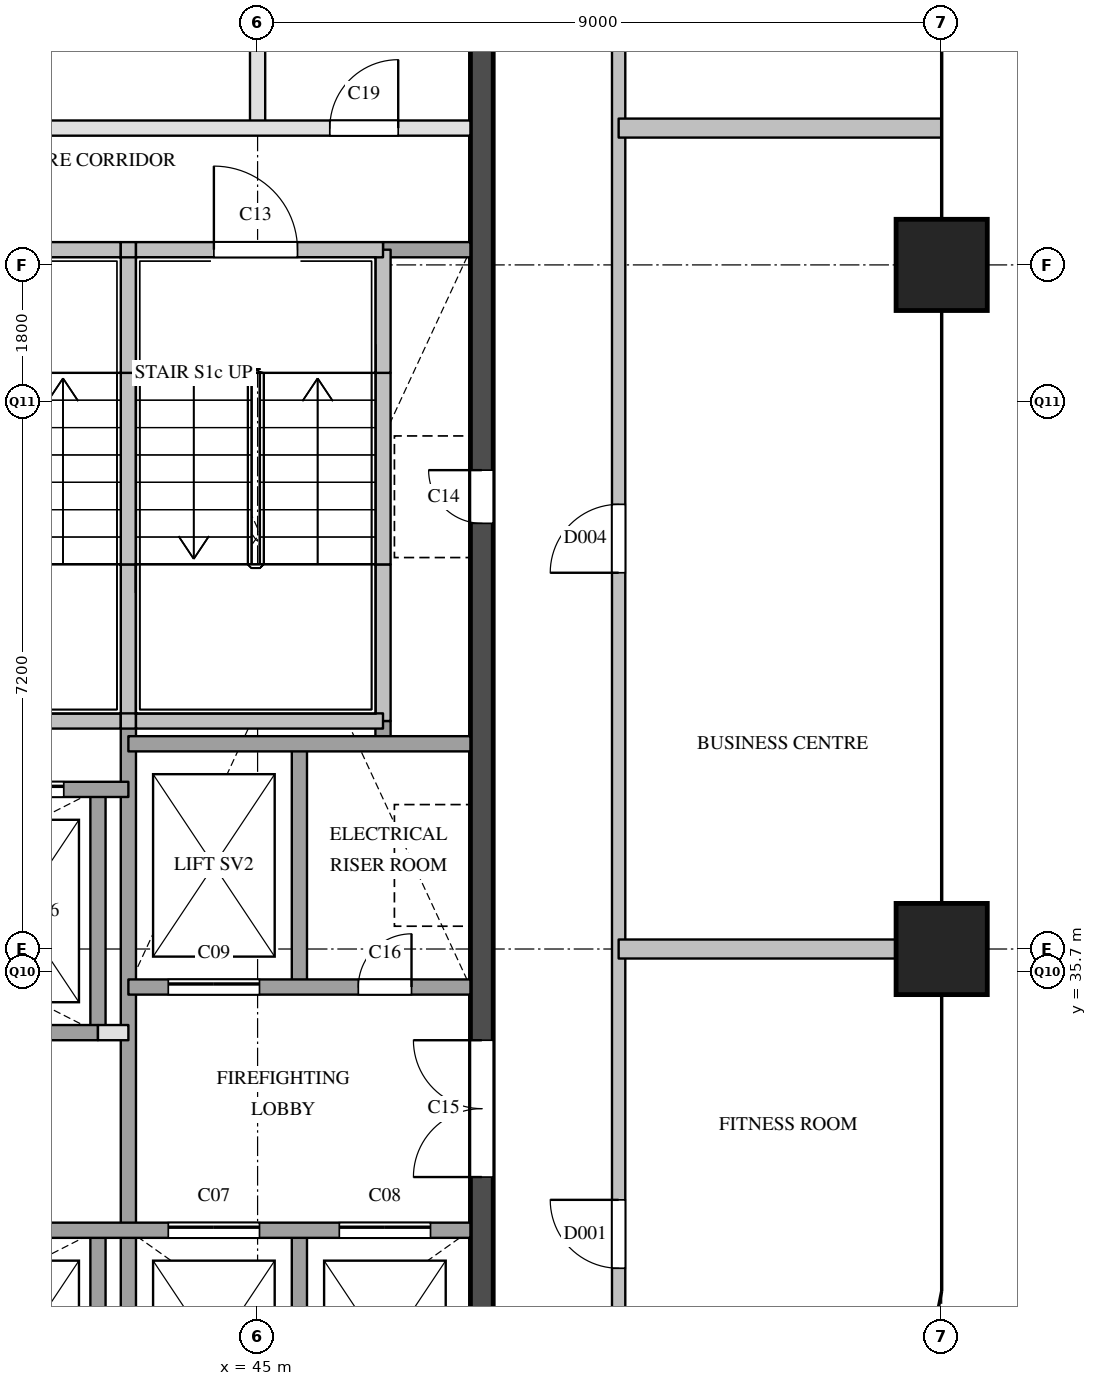
"""IFC4 building model, lengths in metres.
Left out: names, types, materials, properties, quantities, classifications, styles, units other than length and angle.
Written with IfcOpenShell. Run it as: python <this file> out.ifc"""

import sys

from ifc_helpers import new_model, si_unit, direction, frame, frame_2d, origin, origin_2d, place, context, subcontext, project, spatial, rectangle, extrude, element, fill, save


model = new_model("IFC4")
c1 = context("Model", 3, precision=1e-05, world=origin(), true_north=direction((0.0, 1.0)))
c2 = subcontext(c1, "Body", "Model", "MODEL_VIEW")
j1 = project(units=[si_unit("LENGTHUNIT", "METRE"), si_unit("PLANEANGLEUNIT", "RADIAN")], contexts=[c1])
p1 = place(None, origin())
s1 = spatial("IfcSite", under=j1, at=p1, CompositionType="ELEMENT")
p2 = place(p1, origin())
s2 = spatial("IfcBuilding", under=s1, at=p2, CompositionType="ELEMENT")
p3 = place(p2, frame((0.0, 0.0, 290.2)))
s3 = spatial("IfcBuildingStorey", under=s2, at=p3, CompositionType="ELEMENT", Elevation=290.2)
for number, where, z_axis, x_axis in (
    (1, (54.0, 36.0, 0.0), (0.0, 0.0, 1.0), (1.0, 0.0, 0.0)),
    (2, (54.0, 45.0, 0.0), (0.0, 0.0, 1.0), (1.0, 0.0, 0.0)),
):
    element("IfcColumn", number, at=place(p3, frame(where, z_axis=z_axis, x_axis=x_axis)), inside=s3, PredefinedType="COLUMN", context=c2, shape_type="SweptSolid", body=[
        extrude(rectangle(XDim=1.2, YDim=1.2, at=origin_2d()), origin(), (0.0, 0.0, 1.0), 5.0),
    ])
p4 = place(p3, frame((47.95, 29.1, 0.0), z_axis=(0.0, 0.0, 1.0), x_axis=(0.0, 1.0, 0.0)))
e3 = element("IfcWall", 3, at=p4, inside=s3, PredefinedType="SHEAR", context=c2, shape_type="SweptSolid", body=[
    extrude(rectangle(XDim=20.3, YDim=0.3, at=frame_2d((10.15, 0.0))), origin(), (0.0, 0.0, 1.0), 4.5),
])
p5 = place(p4, frame((12.5, 0.0, 0.0)))
e4 = element("IfcOpeningElement", 4, at=p5, cuts=e3, PredefinedType="OPENING", context=c2, shape_type="SweptSolid", body=[
    extrude(rectangle(XDim=0.7, YDim=2.1, at=frame_2d((0.35, 1.05))), frame((0.0, 0.16, 0.0), z_axis=(0.0, -1.0, 0.0), x_axis=(1.0, 0.0, 0.0)), (0.0, 0.0, 1.0), 0.32),
])
p6 = place(p4, frame((3.9, 0.0, 0.0)))
e5 = element("IfcOpeningElement", 5, at=p6, cuts=e3, PredefinedType="OPENING", context=c2, shape_type="SweptSolid", body=[
    extrude(rectangle(XDim=1.8, YDim=2.1, at=frame_2d((0.9, 1.05))), frame((0.0, 0.16, 0.0), z_axis=(0.0, -1.0, 0.0), x_axis=(1.0, 0.0, 0.0)), (0.0, 0.0, 1.0), 0.32),
])
p7 = place(p3, frame((42.9, 29.1, 0.0), z_axis=(0.0, 0.0, 1.0), x_axis=(0.0, 1.0, 0.0)))
e6 = element("IfcWall", 6, at=p7, inside=s3, PredefinedType="SOLIDWALL", context=c2, shape_type="SweptSolid", body=[
    extrude(rectangle(XDim=3.2, YDim=0.2, at=frame_2d((1.6, 0.0))), origin(), (0.0, 0.0, 1.0), 4.5),
])
p8 = place(p3, frame((42.9, 34.9, 0.0), z_axis=(0.0, 0.0, 1.0), x_axis=(0.0, 1.0, 0.0)))
e7 = element("IfcWall", 7, at=p8, inside=s3, PredefinedType="SOLIDWALL", context=c2, shape_type="SweptSolid", body=[
    extrude(rectangle(XDim=3.2, YDim=0.2, at=frame_2d((1.6, 0.0))), origin(), (0.0, 0.0, 1.0), 4.5),
])
p9 = place(p3, frame((43.3, 29.1, 0.0), z_axis=(0.0, 0.0, 1.0), x_axis=(0.0, 1.0, 0.0)))
e8 = element("IfcWall", 8, at=p9, inside=s3, PredefinedType="SOLIDWALL", context=c2, shape_type="SweptSolid", body=[
    extrude(rectangle(XDim=9.9, YDim=0.2, at=frame_2d((4.95, 0.0))), origin(), (0.0, 0.0, 1.0), 4.5),
])
p10 = place(p3, frame((43.3, 39.0, 0.0), z_axis=(0.0, 0.0, 1.0), x_axis=(0.0, 1.0, 0.0)))
e9 = element("IfcWall", 9, at=p10, inside=s3, PredefinedType="SOLIDWALL", context=c2, shape_type="SweptSolid", body=[
    extrude(rectangle(XDim=2.06, YDim=0.2, at=frame_2d((1.03, 0.0))), origin(), (0.0, 0.0, 1.0), 4.5),
])
p11 = place(p3, frame((43.3, 41.06, 0.0), z_axis=(0.0, 0.0, 1.0), x_axis=(0.0, 1.0, 0.0)))
e10 = element("IfcWall", 10, at=p11, inside=s3, PredefinedType="SOLIDWALL", context=c2, shape_type="SweptSolid", body=[
    extrude(rectangle(XDim=2.52, YDim=0.2, at=frame_2d((1.26, 0.0))), origin(), (0.0, 0.0, 1.0), 4.5),
])
p12 = place(p3, frame((43.3, 43.58, 0.0), z_axis=(0.0, 0.0, 1.0), x_axis=(0.0, 1.0, 0.0)))
e11 = element("IfcWall", 11, at=p12, inside=s3, PredefinedType="SOLIDWALL", context=c2, shape_type="SweptSolid", body=[
    extrude(rectangle(XDim=1.62, YDim=0.2, at=frame_2d((0.81, 0.0))), origin(), (0.0, 0.0, 1.0), 4.5),
])
p13 = place(p3, frame((45.0, 46.8, 0.0), z_axis=(0.0, 0.0, 1.0), x_axis=(0.0, 1.0, 0.0)))
e12 = element("IfcWall", 12, at=p13, inside=s3, PredefinedType="PARTITIONING", context=c2, shape_type="SweptSolid", body=[
    extrude(rectangle(XDim=2.2, YDim=0.2, at=frame_2d((1.1, 0.0))), origin(), (0.0, 0.0, 1.0), 4.5),
])
for number, where, z_axis, x_axis in (
    (13, (45.55, 29.1, 0.0), (0.0, 0.0, 1.0), (0.0, 1.0, 0.0)),
    (14, (45.55, 35.5, 0.0), (0.0, 0.0, 1.0), (0.0, 1.0, 0.0)),
):
    element("IfcWall", number, at=place(p3, frame(where, z_axis=z_axis, x_axis=x_axis)), inside=s3, PredefinedType="SOLIDWALL", context=c2, shape_type="SweptSolid", body=[
        extrude(rectangle(XDim=3.2, YDim=0.2, at=frame_2d((1.6, 0.0))), origin(), (0.0, 0.0, 1.0), 4.5),
    ])
p14 = place(p3, frame((46.65, 38.7, 0.0), z_axis=(0.0, 0.0, 1.0), x_axis=(0.0, 1.0, 0.0)))
e15 = element("IfcWall", 15, at=p14, inside=s3, PredefinedType="SOLIDWALL", context=c2, shape_type="SweptSolid", body=[
    extrude(rectangle(XDim=0.3, YDim=0.2, at=frame_2d((0.15, 0.0))), origin(), (0.0, 0.0, 1.0), 4.5),
])
p15 = place(p3, frame((46.65, 39.0, 0.0), z_axis=(0.0, 0.0, 1.0), x_axis=(0.0, 1.0, 0.0)))
e16 = element("IfcWall", 16, at=p15, inside=s3, PredefinedType="SOLIDWALL", context=c2, shape_type="SweptSolid", body=[
    extrude(rectangle(XDim=2.06, YDim=0.2, at=frame_2d((1.03, 0.0))), origin(), (0.0, 0.0, 1.0), 4.5),
])
p16 = place(p3, frame((46.65, 41.06, 0.0), z_axis=(0.0, 0.0, 1.0), x_axis=(0.0, 1.0, 0.0)))
e17 = element("IfcWall", 17, at=p16, inside=s3, PredefinedType="SOLIDWALL", context=c2, shape_type="SweptSolid", body=[
    extrude(rectangle(XDim=2.52, YDim=0.2, at=frame_2d((1.26, 0.0))), origin(), (0.0, 0.0, 1.0), 4.5),
])
p17 = place(p3, frame((46.65, 43.58, 0.0), z_axis=(0.0, 0.0, 1.0), x_axis=(0.0, 1.0, 0.0)))
e18 = element("IfcWall", 18, at=p17, inside=s3, PredefinedType="SOLIDWALL", context=c2, shape_type="SweptSolid", body=[
    extrude(rectangle(XDim=1.62, YDim=0.2, at=frame_2d((0.81, 0.0))), origin(), (0.0, 0.0, 1.0), 4.5),
])
p18 = place(p3, frame((36.6, 32.3, 0.0), z_axis=(0.0, 0.0, 1.0), x_axis=(1.0, 0.0, 0.0)))
e19 = element("IfcWall", 19, at=p18, inside=s3, PredefinedType="SOLIDWALL", context=c2, shape_type="SweptSolid", body=[
    extrude(rectangle(XDim=11.2, YDim=0.2, at=frame_2d((5.6, 0.0))), origin(), (0.0, 0.0, 1.0), 4.5),
])
p19 = place(p18, frame((7.225, 0.0, 0.0)))
e20 = element("IfcOpeningElement", 20, at=p19, cuts=e19, PredefinedType="OPENING", context=c2, shape_type="SweptSolid", body=[
    extrude(rectangle(XDim=1.2, YDim=2.1, at=frame_2d((0.6, 1.05))), frame((0.0, 0.11, 0.0), z_axis=(0.0, -1.0, 0.0), x_axis=(1.0, 0.0, 0.0)), (0.0, 0.0, 1.0), 0.22),
])
p20 = place(p18, frame((9.475, 0.0, 0.0)))
e21 = element("IfcOpeningElement", 21, at=p20, cuts=e19, PredefinedType="OPENING", context=c2, shape_type="SweptSolid", body=[
    extrude(rectangle(XDim=1.2, YDim=2.1, at=frame_2d((0.6, 1.05))), frame((0.0, 0.11, 0.0), z_axis=(0.0, -1.0, 0.0), x_axis=(1.0, 0.0, 0.0)), (0.0, 0.0, 1.0), 0.22),
])
p21 = place(p3, frame((42.9, 34.9, 0.0), z_axis=(0.0, 0.0, 1.0), x_axis=(1.0, 0.0, 0.0)))
e22 = element("IfcWall", 22, at=p21, inside=s3, PredefinedType="PARTITIONING", context=c2, shape_type="SweptSolid", body=[
    extrude(rectangle(XDim=0.4, YDim=0.2, at=frame_2d((0.2, 0.0))), origin(), (0.0, 0.0, 1.0), 4.5),
])
p22 = place(p3, frame((36.6, 34.9, 0.0), z_axis=(0.0, 0.0, 1.0), x_axis=(1.0, 0.0, 0.0)))
e23 = element("IfcWall", 23, at=p22, inside=s3, PredefinedType="SOLIDWALL", context=c2, shape_type="SweptSolid", body=[
    extrude(rectangle(XDim=6.3, YDim=0.2, at=frame_2d((3.15, 0.0))), origin(), (0.0, 0.0, 1.0), 4.5),
])
p23 = place(p3, frame((43.3, 35.5, 0.0), z_axis=(0.0, 0.0, 1.0), x_axis=(1.0, 0.0, 0.0)))
e24 = element("IfcWall", 24, at=p23, inside=s3, PredefinedType="SOLIDWALL", context=c2, shape_type="SweptSolid", body=[
    extrude(rectangle(XDim=4.5, YDim=0.2, at=frame_2d((2.25, 0.0))), origin(), (0.0, 0.0, 1.0), 4.5),
])
p24 = place(p23, frame((0.525, 0.0, 0.0)))
e25 = element("IfcOpeningElement", 25, at=p24, cuts=e24, PredefinedType="OPENING", context=c2, shape_type="SweptSolid", body=[
    extrude(rectangle(XDim=1.2, YDim=2.1, at=frame_2d((0.6, 1.05))), frame((0.0, 0.11, 0.0), z_axis=(0.0, -1.0, 0.0), x_axis=(1.0, 0.0, 0.0)), (0.0, 0.0, 1.0), 0.22),
])
p25 = place(p23, frame((3.025, 0.0, 0.0)))
e26 = element("IfcOpeningElement", 26, at=p25, cuts=e24, PredefinedType="OPENING", context=c2, shape_type="SweptSolid", body=[
    extrude(rectangle(XDim=0.7, YDim=2.1, at=frame_2d((0.35, 1.05))), frame((0.0, 0.11, 0.0), z_axis=(0.0, -1.0, 0.0), x_axis=(1.0, 0.0, 0.0)), (0.0, 0.0, 1.0), 0.22),
])
p26 = place(p3, frame((36.6, 38.1, 0.0), z_axis=(0.0, 0.0, 1.0), x_axis=(1.0, 0.0, 0.0)))
e27 = element("IfcWall", 27, at=p26, inside=s3, PredefinedType="SOLIDWALL", context=c2, shape_type="SweptSolid", body=[
    extrude(rectangle(XDim=6.7, YDim=0.2, at=frame_2d((3.35, 0.0))), origin(), (0.0, 0.0, 1.0), 4.5),
])
p27 = place(p26, frame((0.45, 0.0, 0.0)))
e28 = element("IfcOpeningElement", 28, at=p27, cuts=e27, PredefinedType="OPENING", context=c2, shape_type="SweptSolid", body=[
    extrude(rectangle(XDim=1.2, YDim=2.1, at=frame_2d((0.6, 1.05))), frame((0.0, 0.11, 0.0), z_axis=(0.0, -1.0, 0.0), x_axis=(1.0, 0.0, 0.0)), (0.0, 0.0, 1.0), 0.22),
])
p28 = place(p26, frame((2.55, 0.0, 0.0)))
e29 = element("IfcOpeningElement", 29, at=p28, cuts=e27, PredefinedType="OPENING", context=c2, shape_type="SweptSolid", body=[
    extrude(rectangle(XDim=1.2, YDim=2.1, at=frame_2d((0.6, 1.05))), frame((0.0, 0.11, 0.0), z_axis=(0.0, -1.0, 0.0), x_axis=(1.0, 0.0, 0.0)), (0.0, 0.0, 1.0), 0.22),
])
p29 = place(p26, frame((4.65, 0.0, 0.0)))
e30 = element("IfcOpeningElement", 30, at=p29, cuts=e27, PredefinedType="OPENING", context=c2, shape_type="SweptSolid", body=[
    extrude(rectangle(XDim=1.2, YDim=2.1, at=frame_2d((0.6, 1.05))), frame((0.0, 0.11, 0.0), z_axis=(0.0, -1.0, 0.0), x_axis=(1.0, 0.0, 0.0)), (0.0, 0.0, 1.0), 0.22),
])
p30 = place(p3, frame((43.3, 38.7, 0.0), z_axis=(0.0, 0.0, 1.0), x_axis=(1.0, 0.0, 0.0)))
e31 = element("IfcWall", 31, at=p30, inside=s3, PredefinedType="SOLIDWALL", context=c2, shape_type="SweptSolid", body=[
    extrude(rectangle(XDim=4.5, YDim=0.2, at=frame_2d((2.25, 0.0))), origin(), (0.0, 0.0, 1.0), 4.5),
])
p31 = place(p3, frame((40.05, 39.0, 0.0), z_axis=(0.0, 0.0, 1.0), x_axis=(1.0, 0.0, 0.0)))
e32 = element("IfcWall", 32, at=p31, inside=s3, PredefinedType="SOLIDWALL", context=c2, shape_type="SweptSolid", body=[
    extrude(rectangle(XDim=3.15, YDim=0.2, at=frame_2d((1.575, 0.0))), origin(), (0.0, 0.0, 1.0), 4.5),
])
p32 = place(p3, frame((43.2, 39.0, 0.0), z_axis=(0.0, 0.0, 1.0), x_axis=(1.0, 0.0, 0.0)))
e33 = element("IfcWall", 33, at=p32, inside=s3, PredefinedType="SOLIDWALL", context=c2, shape_type="SweptSolid", body=[
    extrude(rectangle(XDim=0.2, YDim=0.2, at=frame_2d((0.1, 0.0))), origin(), (0.0, 0.0, 1.0), 4.5),
])
p33 = place(p3, frame((43.4, 39.0, 0.0), z_axis=(0.0, 0.0, 1.0), x_axis=(1.0, 0.0, 0.0)))
e34 = element("IfcWall", 34, at=p33, inside=s3, PredefinedType="SOLIDWALL", context=c2, shape_type="SweptSolid", body=[
    extrude(rectangle(XDim=3.25, YDim=0.2, at=frame_2d((1.625, 0.0))), origin(), (0.0, 0.0, 1.0), 4.5),
])
p34 = place(p3, frame((46.65, 45.2, 0.0), z_axis=(0.0, 0.0, 1.0), x_axis=(1.0, 0.0, 0.0)))
e35 = element("IfcWall", 35, at=p34, inside=s3, PredefinedType="SOLIDWALL", context=c2, shape_type="SweptSolid", body=[
    extrude(rectangle(XDim=1.15, YDim=0.2, at=frame_2d((0.575, 0.0))), origin(), (0.0, 0.0, 1.0), 4.5),
])
p35 = place(p3, frame((40.05, 45.2, 0.0), z_axis=(0.0, 0.0, 1.0), x_axis=(1.0, 0.0, 0.0)))
e36 = element("IfcWall", 36, at=p35, inside=s3, PredefinedType="SOLIDWALL", context=c2, shape_type="SweptSolid", body=[
    extrude(rectangle(XDim=3.15, YDim=0.2, at=frame_2d((1.575, 0.0))), origin(), (0.0, 0.0, 1.0), 4.5),
])
p36 = place(p35, frame((1.025, 0.0, 0.0)))
e37 = element("IfcOpeningElement", 37, at=p36, cuts=e36, PredefinedType="OPENING", context=c2, shape_type="SweptSolid", body=[
    extrude(rectangle(XDim=1.1, YDim=2.1, at=frame_2d((0.55, 1.05))), frame((0.0, 0.11, 0.0), z_axis=(0.0, -1.0, 0.0), x_axis=(1.0, 0.0, 0.0)), (0.0, 0.0, 1.0), 0.22),
])
p37 = place(p3, frame((43.2, 45.2, 0.0), z_axis=(0.0, 0.0, 1.0), x_axis=(1.0, 0.0, 0.0)))
e38 = element("IfcWall", 38, at=p37, inside=s3, PredefinedType="SOLIDWALL", context=c2, shape_type="SweptSolid", body=[
    extrude(rectangle(XDim=0.2, YDim=0.2, at=frame_2d((0.1, 0.0))), origin(), (0.0, 0.0, 1.0), 4.5),
])
p38 = place(p3, frame((43.4, 45.2, 0.0), z_axis=(0.0, 0.0, 1.0), x_axis=(1.0, 0.0, 0.0)))
e39 = element("IfcWall", 39, at=p38, inside=s3, PredefinedType="SOLIDWALL", context=c2, shape_type="SweptSolid", body=[
    extrude(rectangle(XDim=3.25, YDim=0.2, at=frame_2d((1.625, 0.0))), origin(), (0.0, 0.0, 1.0), 4.5),
])
p39 = place(p38, frame((1.025, 0.0, 0.0)))
e40 = element("IfcOpeningElement", 40, at=p39, cuts=e39, PredefinedType="OPENING", context=c2, shape_type="SweptSolid", body=[
    extrude(rectangle(XDim=1.1, YDim=2.1, at=frame_2d((0.55, 1.05))), frame((0.0, 0.11, 0.0), z_axis=(0.0, -1.0, 0.0), x_axis=(1.0, 0.0, 0.0)), (0.0, 0.0, 1.0), 0.22),
])
p40 = place(p3, frame((36.6, 46.8, 0.0), z_axis=(0.0, 0.0, 1.0), x_axis=(1.0, 0.0, 0.0)))
e41 = element("IfcWall", 41, at=p40, inside=s3, PredefinedType="PARTITIONING", context=c2, shape_type="SweptSolid", body=[
    extrude(rectangle(XDim=11.2, YDim=0.2, at=frame_2d((5.6, 0.0))), origin(), (0.0, 0.0, 1.0), 4.5),
])
p41 = place(p40, frame((3.75, 0.0, 0.0)))
e42 = element("IfcOpeningElement", 42, at=p41, cuts=e41, PredefinedType="OPENING", context=c2, shape_type="SweptSolid", body=[
    extrude(rectangle(XDim=0.9, YDim=2.1, at=frame_2d((0.45, 1.05))), frame((0.0, 0.11, 0.0), z_axis=(0.0, -1.0, 0.0), x_axis=(1.0, 0.0, 0.0)), (0.0, 0.0, 1.0), 0.22),
])
p42 = place(p40, frame((9.35, 0.0, 0.0)))
e43 = element("IfcOpeningElement", 43, at=p42, cuts=e41, PredefinedType="OPENING", context=c2, shape_type="SweptSolid", body=[
    extrude(rectangle(XDim=0.9, YDim=2.1, at=frame_2d((0.45, 1.05))), frame((0.0, 0.11, 0.0), z_axis=(0.0, -1.0, 0.0), x_axis=(1.0, 0.0, 0.0)), (0.0, 0.0, 1.0), 0.22),
])
p43 = place(p3, frame((49.75, 28.5, 0.0), z_axis=(0.0, 0.0, 1.0), x_axis=(0.0, 1.0, 0.0)))
e44 = element("IfcWall", 44, at=p43, inside=s3, PredefinedType="PARTITIONING", context=c2, shape_type="SweptSolid", body=[
    extrude(rectangle(XDim=22.85, YDim=0.175, at=frame_2d((11.425, 0.0))), origin(), (0.0, 0.0, 1.0), 4.5),
])
p44 = place(p43, frame((3.3, 0.0, 0.0)))
e45 = element("IfcOpeningElement", 45, at=p44, cuts=e44, PredefinedType="OPENING", context=c2, shape_type="SweptSolid", body=[
    extrude(rectangle(XDim=0.9, YDim=2.1, at=frame_2d((0.45, 1.05))), frame((0.0, 0.097, 0.0), z_axis=(0.0, -1.0, 0.0), x_axis=(1.0, 0.0, 0.0)), (0.0, 0.0, 1.0), 0.195),
])
p45 = place(p43, frame((12.45, 0.0, 0.0)))
e46 = element("IfcOpeningElement", 46, at=p45, cuts=e44, PredefinedType="OPENING", context=c2, shape_type="SweptSolid", body=[
    extrude(rectangle(XDim=0.9, YDim=2.1, at=frame_2d((0.45, 1.05))), frame((0.0, 0.097, 0.0), z_axis=(0.0, -1.0, 0.0), x_axis=(1.0, 0.0, 0.0)), (0.0, 0.0, 1.0), 0.195),
])
p46 = place(p43, frame((20.125, 0.0, 0.0)))
e47 = element("IfcOpeningElement", 47, at=p46, cuts=e44, PredefinedType="OPENING", context=c2, shape_type="SweptSolid", body=[
    extrude(rectangle(XDim=0.9, YDim=2.1, at=frame_2d((0.45, 1.05))), frame((0.0, 0.097, 0.0), z_axis=(0.0, -1.0, 0.0), x_axis=(1.0, 0.0, 0.0)), (0.0, 0.0, 1.0), 0.195),
])
p47 = place(p3, frame((49.75, 36.0, 0.0), z_axis=(0.0, 0.0, 1.0), x_axis=(1.0, 0.0, 0.0)))
e48 = element("IfcWall", 48, at=p47, inside=s3, PredefinedType="PARTITIONING", context=c2, shape_type="SweptSolid", body=[
    extrude(rectangle(XDim=4.25, YDim=0.25, at=frame_2d((2.125, 0.0))), origin(), (0.0, 0.0, 1.0), 4.5),
])
p48 = place(p3, frame((49.75, 46.8, 0.0), z_axis=(0.0, 0.0, 1.0), x_axis=(1.0, 0.0, 0.0)))
e49 = element("IfcWall", 49, at=p48, inside=s3, PredefinedType="PARTITIONING", context=c2, shape_type="SweptSolid", body=[
    extrude(rectangle(XDim=4.25, YDim=0.25, at=frame_2d((2.125, 0.0))), origin(), (0.0, 0.0, 1.0), 3.5),
])
p49 = place(p29, origin())
e50 = element("IfcDoor", 50, at=p49, inside=s3, OperationType="SLIDING_TO_LEFT", PredefinedType="DOOR", context=c2, shape_type="SweptSolid", body=[
    extrude(rectangle(XDim=1.2, YDim=2.1, at=frame_2d((0.6, 1.05))), frame((0.0, 0.025, 0.0), z_axis=(0.0, -1.0, 0.0), x_axis=(1.0, 0.0, 0.0)), (0.0, 0.0, 1.0), 0.05),
])
fill(e30, e50)
p50 = place(p19, origin())
e51 = element("IfcDoor", 51, at=p50, inside=s3, OperationType="SLIDING_TO_LEFT", PredefinedType="DOOR", context=c2, shape_type="SweptSolid", body=[
    extrude(rectangle(XDim=1.2, YDim=2.1, at=frame_2d((0.6, 1.05))), frame((0.0, 0.025, 0.0), z_axis=(0.0, -1.0, 0.0), x_axis=(1.0, 0.0, 0.0)), (0.0, 0.0, 1.0), 0.05),
])
fill(e20, e51)
p51 = place(p20, origin())
e52 = element("IfcDoor", 52, at=p51, inside=s3, OperationType="SLIDING_TO_LEFT", PredefinedType="DOOR", context=c2, shape_type="SweptSolid", body=[
    extrude(rectangle(XDim=1.2, YDim=2.1, at=frame_2d((0.6, 1.05))), frame((0.0, 0.025, 0.0), z_axis=(0.0, -1.0, 0.0), x_axis=(1.0, 0.0, 0.0)), (0.0, 0.0, 1.0), 0.05),
])
fill(e21, e52)
p52 = place(p24, origin())
e53 = element("IfcDoor", 53, at=p52, inside=s3, OperationType="SLIDING_TO_LEFT", PredefinedType="DOOR", context=c2, shape_type="SweptSolid", body=[
    extrude(rectangle(XDim=1.2, YDim=2.1, at=frame_2d((0.6, 1.05))), frame((0.0, 0.025, 0.0), z_axis=(0.0, -1.0, 0.0), x_axis=(1.0, 0.0, 0.0)), (0.0, 0.0, 1.0), 0.05),
])
fill(e25, e53)
p53 = place(p39, origin())
e54 = element("IfcDoor", 54, at=p53, inside=s3, OperationType="SINGLE_SWING_LEFT", PredefinedType="DOOR", context=c2, shape_type="SweptSolid", body=[
    extrude(rectangle(XDim=1.1, YDim=2.1, at=frame_2d((0.55, 1.05))), frame((0.0, 0.025, 0.0), z_axis=(0.0, -1.0, 0.0), x_axis=(1.0, 0.0, 0.0)), (0.0, 0.0, 1.0), 0.05),
])
fill(e40, e54)
p54 = place(p5, origin())
e55 = element("IfcDoor", 55, at=p54, inside=s3, OperationType="SINGLE_SWING_RIGHT", PredefinedType="DOOR", context=c2, shape_type="SweptSolid", body=[
    extrude(rectangle(XDim=0.7, YDim=2.1, at=frame_2d((0.35, 1.05))), frame((0.0, 0.025, 0.0), z_axis=(0.0, -1.0, 0.0), x_axis=(1.0, 0.0, 0.0)), (0.0, 0.0, 1.0), 0.05),
])
fill(e4, e55)
p55 = place(p6, origin())
e56 = element("IfcDoor", 56, at=p55, inside=s3, OperationType="DOUBLE_DOOR_SINGLE_SWING", PredefinedType="DOOR", context=c2, shape_type="SweptSolid", body=[
    extrude(rectangle(XDim=1.8, YDim=2.1, at=frame_2d((0.9, 1.05))), frame((0.0, 0.025, 0.0), z_axis=(0.0, -1.0, 0.0), x_axis=(1.0, 0.0, 0.0)), (0.0, 0.0, 1.0), 0.05),
])
fill(e5, e56)
p56 = place(p25, origin())
e57 = element("IfcDoor", 57, at=p56, inside=s3, OperationType="SINGLE_SWING_RIGHT", PredefinedType="DOOR", context=c2, shape_type="SweptSolid", body=[
    extrude(rectangle(XDim=0.7, YDim=2.1, at=frame_2d((0.35, 1.05))), frame((0.0, 0.025, 0.0), z_axis=(0.0, -1.0, 0.0), x_axis=(1.0, 0.0, 0.0)), (0.0, 0.0, 1.0), 0.05),
])
fill(e26, e57)
p57 = place(p42, origin())
e58 = element("IfcDoor", 58, at=p57, inside=s3, OperationType="SINGLE_SWING_RIGHT", PredefinedType="DOOR", context=c2, shape_type="SweptSolid", body=[
    extrude(rectangle(XDim=0.9, YDim=2.1, at=frame_2d((0.45, 1.05))), frame((0.0, 0.025, 0.0), z_axis=(0.0, -1.0, 0.0), x_axis=(1.0, 0.0, 0.0)), (0.0, 0.0, 1.0), 0.05),
])
fill(e43, e58)
p58 = place(p44, origin())
e59 = element("IfcDoor", 59, at=p58, inside=s3, OperationType="SINGLE_SWING_RIGHT", PredefinedType="DOOR", context=c2, shape_type="SweptSolid", body=[
    extrude(rectangle(XDim=0.9, YDim=2.1, at=frame_2d((0.45, 1.05))), frame((0.0, 0.025, 0.0), z_axis=(0.0, -1.0, 0.0), x_axis=(1.0, 0.0, 0.0)), (0.0, 0.0, 1.0), 0.05),
])
fill(e45, e59)
p59 = place(p45, origin())
e60 = element("IfcDoor", 60, at=p59, inside=s3, OperationType="SINGLE_SWING_LEFT", PredefinedType="DOOR", context=c2, shape_type="SweptSolid", body=[
    extrude(rectangle(XDim=0.9, YDim=2.1, at=frame_2d((0.45, 1.05))), frame((0.0, 0.025, 0.0), z_axis=(0.0, -1.0, 0.0), x_axis=(1.0, 0.0, 0.0)), (0.0, 0.0, 1.0), 0.05),
])
fill(e46, e60)
save(model, sys.argv[1])
